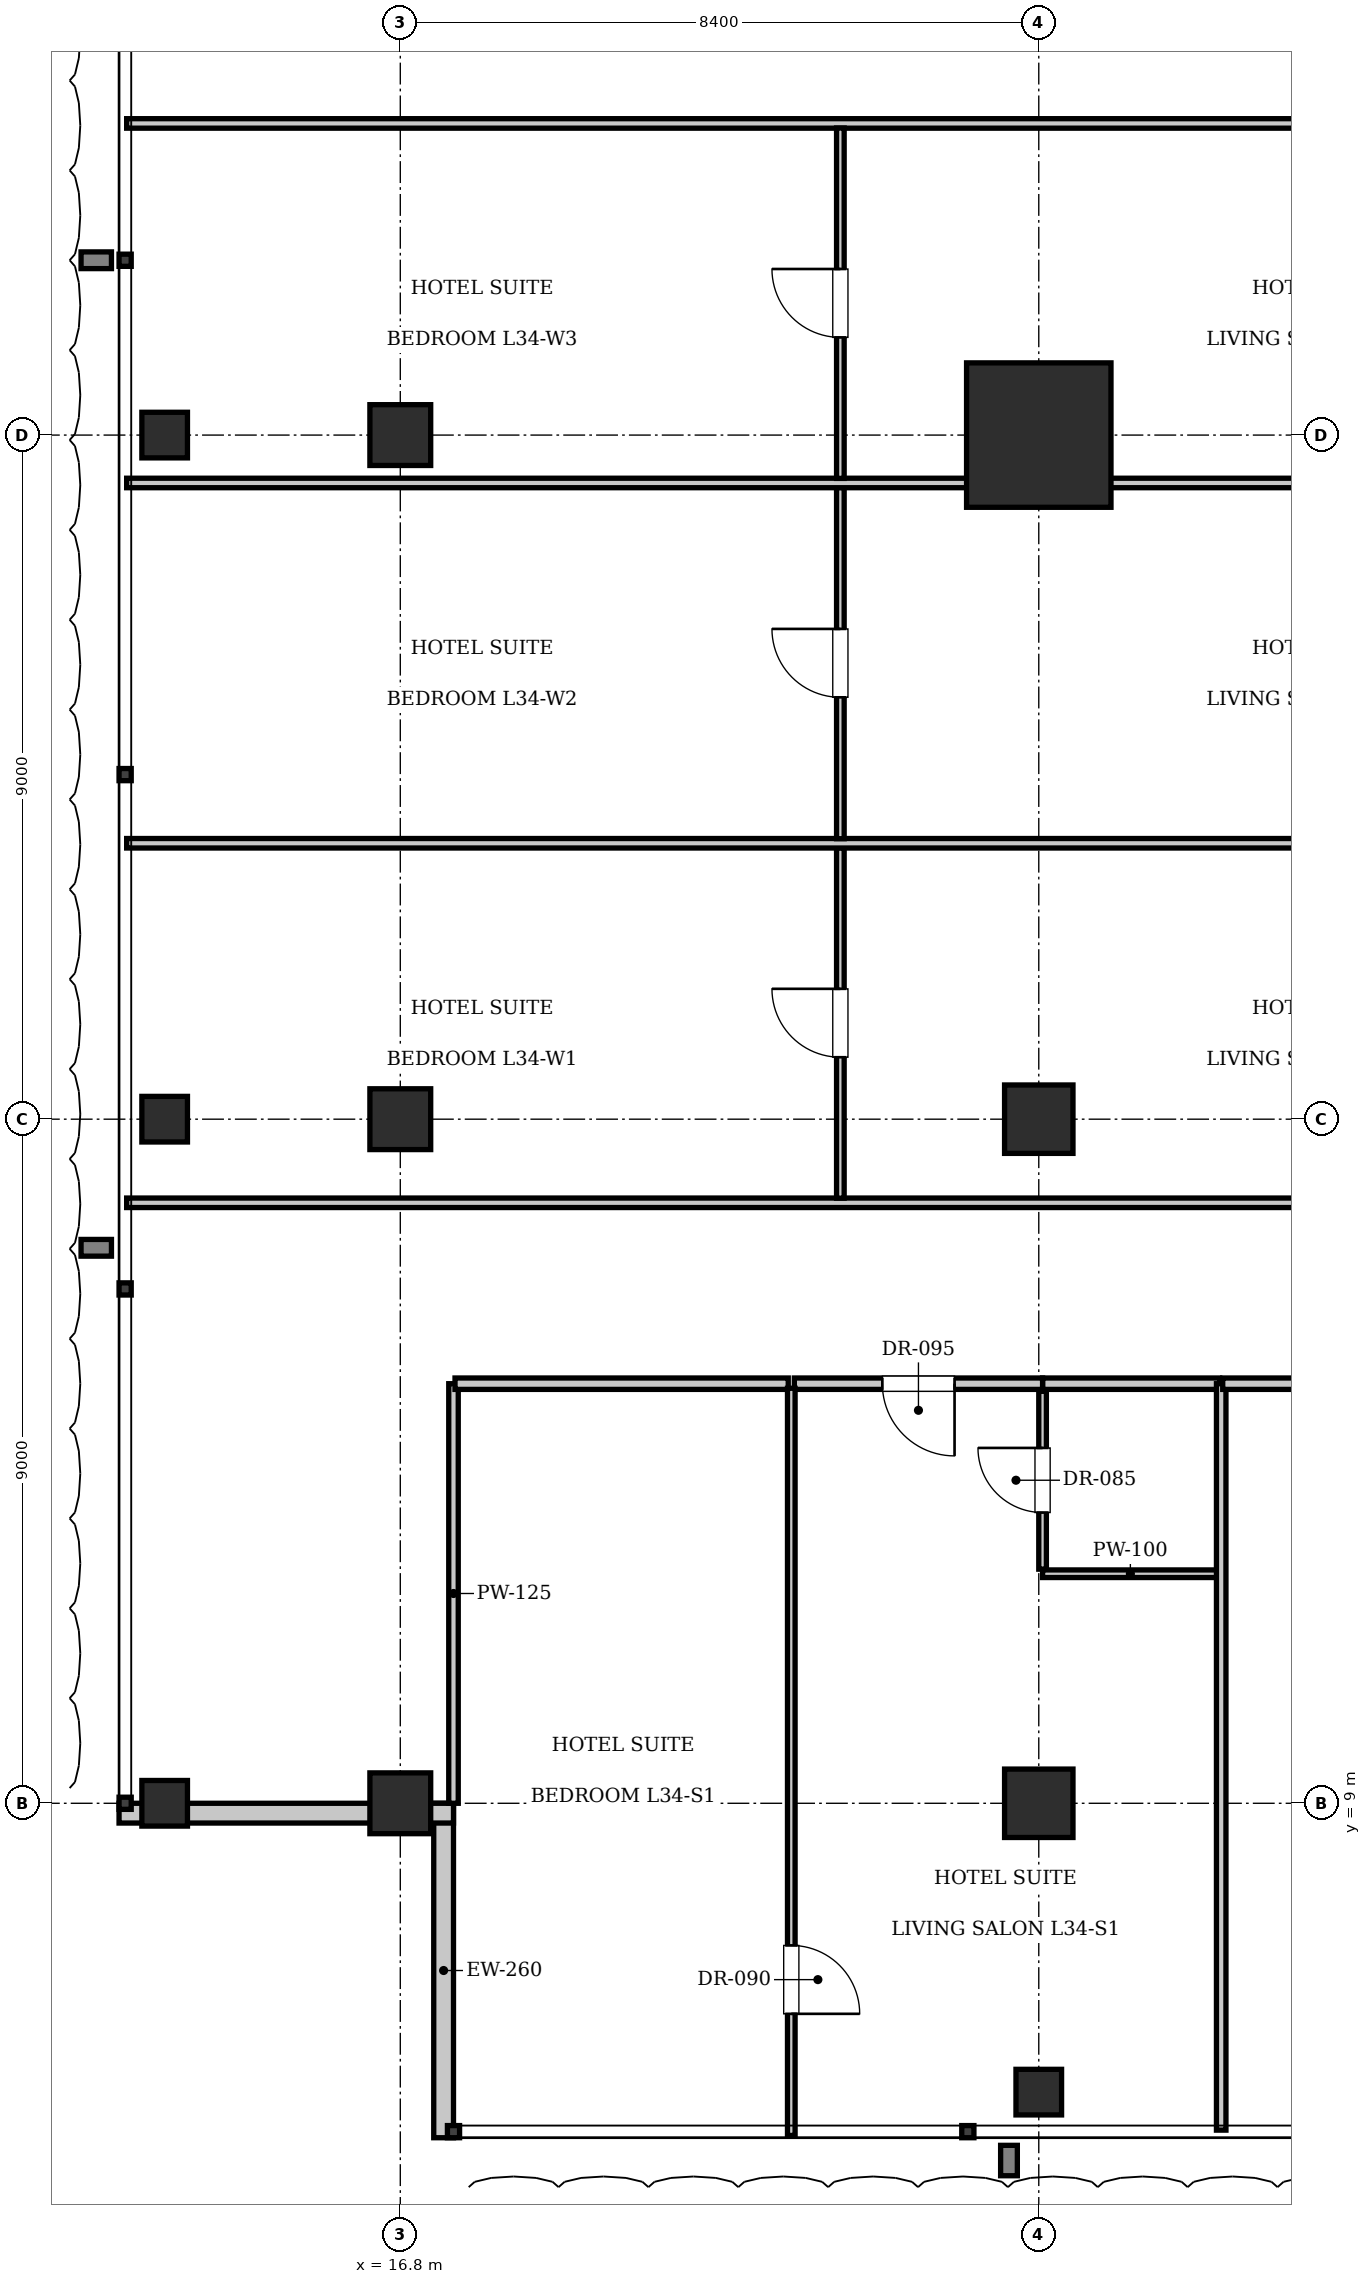
"""IFC4 building model, lengths in metres.
Left out: names, types, materials, properties, quantities, classifications, styles, units other than length and angle.
Written with IfcOpenShell. Run it as: python <this file> out.ifc"""

import sys

from ifc_helpers import new_model, si_unit, direction, frame, frame_2d, origin, origin_2d, place, context, subcontext, project, spatial, rectangle, i_section, extrude, element, fill, save


model = new_model("IFC4")
c1 = context("Model", 3, precision=1e-05, world=origin(), true_north=direction((0.0, 1.0)))
c2 = subcontext(c1, "Body", "Model", "MODEL_VIEW")
j1 = project(units=[si_unit("LENGTHUNIT", "METRE"), si_unit("PLANEANGLEUNIT", "RADIAN")], contexts=[c1])
p1 = place(None, origin())
s1 = spatial("IfcSite", under=j1, at=p1, CompositionType="ELEMENT")
p2 = place(p1, origin())
s2 = spatial("IfcBuilding", under=s1, at=p2, CompositionType="ELEMENT")
p3 = place(p2, frame((0.0, 0.0, 142.8)))
s3 = spatial("IfcBuildingStorey", under=s2, at=p3, CompositionType="ELEMENT", Elevation=142.8)
p4 = place(p3, frame((25.2, 27.0, 0.0), z_axis=(0.0, 0.0, 1.0), x_axis=(1.0, 0.0, 0.0)))
e1 = element("IfcColumn", 1, at=p4, inside=s3, PredefinedType="COLUMN", context=c2, shape_type="SweptSolid", body=[
    extrude(rectangle(XDim=1.9, YDim=1.9, at=origin_2d()), origin(), (0.0, 0.0, 1.0), 3.85),
])
for number, where, z_axis, x_axis in (
    (2, (25.2, 18.0, 0.0), (0.0, 0.0, 1.0), (1.0, 0.0, 0.0)),
    (3, (25.2, 9.0, 0.0), (0.0, 0.0, 1.0), (1.0, 0.0, 0.0)),
):
    element("IfcColumn", number, at=place(p3, frame(where, z_axis=z_axis, x_axis=x_axis)), inside=s3, PredefinedType="COLUMN", context=c2, shape_type="SweptSolid", body=[
        extrude(rectangle(XDim=0.9, YDim=0.9, at=origin_2d()), origin(), (0.0, 0.0, 1.0), 3.85),
    ])
for number, where, z_axis, x_axis in (
    (4, (16.8, 9.0, 0.0), (0.0, 0.0, 1.0), (1.0, 0.0, 0.0)),
    (5, (16.8, 18.0, 0.0), (0.0, 0.0, 1.0), (1.0, 0.0, 0.0)),
    (6, (16.8, 27.0, 0.0), (0.0, 0.0, 1.0), (1.0, 0.0, 0.0)),
):
    element("IfcColumn", number, at=place(p3, frame(where, z_axis=z_axis, x_axis=x_axis)), inside=s3, PredefinedType="COLUMN", context=c2, shape_type="SweptSolid", body=[
        extrude(rectangle(XDim=0.8, YDim=0.8, at=origin_2d()), origin(), (0.0, 0.0, 1.0), 3.85),
    ])
for number, where, z_axis, x_axis in (
    (7, (13.7, 9.0, 0.0), (0.0, 0.0, 1.0), (1.0, 0.0, 0.0)),
    (8, (13.7, 18.0, 0.0), (0.0, 0.0, 1.0), (1.0, 0.0, 0.0)),
    (9, (13.7, 27.0, 0.0), (0.0, 0.0, 1.0), (1.0, 0.0, 0.0)),
    (10, (25.2, 5.2, 0.0), (0.0, 0.0, 1.0), (1.0, 0.0, 0.0)),
):
    element("IfcColumn", number, at=place(p3, frame(where, z_axis=z_axis, x_axis=x_axis)), inside=s3, PredefinedType="COLUMN", context=c2, shape_type="SweptSolid", body=[
        extrude(i_section(OverallWidth=0.6, OverallDepth=0.6, WebThickness=0.025, FlangeThickness=0.038, at=origin_2d()), origin(), (0.0, 0.0, 1.0), 3.85),
    ])
p5 = place(p3, frame((17.37, 4.6, 0.0), z_axis=(0.0, 0.0, 1.0), x_axis=(0.0, 1.0, 0.0)))
e11 = element("IfcWall", 11, at=p5, inside=s3, PredefinedType="SOLIDWALL", context=c2, shape_type="SweptSolid", body=[
    extrude(rectangle(XDim=4.4, YDim=0.26, at=frame_2d((2.2, 0.0))), origin(), (0.0, 0.0, 1.0), 3.61),
])
p6 = place(p3, frame((17.5, 8.87, 0.0), z_axis=(0.0, 0.0, 1.0), x_axis=(-1.0, 0.0, 0.0)))
e12 = element("IfcWall", 12, at=p6, inside=s3, PredefinedType="SOLIDWALL", context=c2, shape_type="SweptSolid", body=[
    extrude(rectangle(XDim=4.4, YDim=0.26, at=frame_2d((2.2, 0.0))), origin(), (0.0, 0.0, 1.0), 2.998),
])
p7 = place(p3, frame((17.5, 9.0, 0.0), z_axis=(0.0, 0.0, 1.0), x_axis=(0.0, 1.0, 0.0)))
e13 = element("IfcWall", 13, at=p7, inside=s3, PredefinedType="PARTITIONING", context=c2, shape_type="SweptSolid", body=[
    extrude(rectangle(XDim=5.52, YDim=0.125, at=frame_2d((2.76, 0.0))), origin(), (0.0, 0.0, 1.0), 3.61),
])
p8 = place(p3, frame((25.25, 14.52, 0.0), z_axis=(0.0, 0.0, 1.0), x_axis=(1.0, 0.0, 0.0)))
e14 = element("IfcWall", 14, at=p8, inside=s3, PredefinedType="PARTITIONING", context=c2, shape_type="SweptSolid", body=[
    extrude(rectangle(XDim=2.33, YDim=0.15, at=frame_2d((1.165, 0.0))), origin(), (0.0, 0.0, 1.0), 3.61),
])
p9 = place(p3, frame((25.25, 12.02, 0.0), z_axis=(0.0, 0.0, 1.0), x_axis=(1.0, 0.0, 0.0)))
e15 = element("IfcWall", 15, at=p9, inside=s3, PredefinedType="PARTITIONING", context=c2, shape_type="SweptSolid", body=[
    extrude(rectangle(XDim=2.31, YDim=0.1, at=frame_2d((1.155, 0.0))), origin(), (0.0, 0.0, 1.0), 3.61),
])
p10 = place(p3, frame((25.25, 12.08, 0.0), z_axis=(0.0, 0.0, 1.0), x_axis=(0.0, 1.0, 0.0)))
e16 = element("IfcWall", 16, at=p10, inside=s3, PredefinedType="PARTITIONING", context=c2, shape_type="SweptSolid", body=[
    extrude(rectangle(XDim=2.34, YDim=0.1, at=frame_2d((1.17, 0.0))), origin(), (0.0, 0.0, 1.0), 2.998),
])
p11 = place(p10, frame((0.745, 0.0, 0.0)))
e17 = element("IfcOpeningElement", 17, at=p11, cuts=e16, PredefinedType="OPENING", context=c2, shape_type="SweptSolid", body=[
    extrude(rectangle(XDim=0.85, YDim=2.1, at=frame_2d((0.425, 1.05))), frame((0.0, 0.06, 0.0), z_axis=(0.0, -1.0, 0.0), x_axis=(1.0, 0.0, 0.0)), (0.0, 0.0, 1.0), 0.12),
])
p12 = place(p3, frame((17.52, 14.52, 0.0), z_axis=(0.0, 0.0, 1.0), x_axis=(1.0, 0.0, 0.0)))
e18 = element("IfcWall", 18, at=p12, inside=s3, PredefinedType="PARTITIONING", context=c2, shape_type="SweptSolid", body=[
    extrude(rectangle(XDim=4.384, YDim=0.15, at=frame_2d((2.192, 0.0))), origin(), (0.0, 0.0, 1.0), 3.61),
])
p13 = place(p3, frame((21.984, 14.52, 0.0), z_axis=(0.0, 0.0, 1.0), x_axis=(1.0, 0.0, 0.0)))
e19 = element("IfcWall", 19, at=p13, inside=s3, PredefinedType="PARTITIONING", context=c2, shape_type="SweptSolid", body=[
    extrude(rectangle(XDim=3.266, YDim=0.15, at=frame_2d((1.633, 0.0))), origin(), (0.0, 0.0, 1.0), 3.61),
])
p14 = place(p13, frame((1.158, 0.0, 0.0)))
e20 = element("IfcOpeningElement", 20, at=p14, cuts=e19, PredefinedType="OPENING", context=c2, shape_type="SweptSolid", body=[
    extrude(rectangle(XDim=0.95, YDim=2.15, at=frame_2d((0.475, 1.075))), frame((0.0, 0.085, 0.0), z_axis=(0.0, -1.0, 0.0), x_axis=(1.0, 0.0, 0.0)), (0.0, 0.0, 1.0), 0.17),
])
p15 = place(p3, frame((21.944, 4.63, 0.0), z_axis=(0.0, 0.0, 1.0), x_axis=(0.0, 1.0, 0.0)))
e21 = element("IfcWall", 21, at=p15, inside=s3, PredefinedType="PARTITIONING", context=c2, shape_type="SweptSolid", body=[
    extrude(rectangle(XDim=9.83, YDim=0.1, at=frame_2d((4.915, 0.0))), origin(), (0.0, 0.0, 1.0), 3.61),
])
p16 = place(p15, frame((1.6, 0.0, 0.0)))
e22 = element("IfcOpeningElement", 22, at=p16, cuts=e21, PredefinedType="OPENING", context=c2, shape_type="SweptSolid", body=[
    extrude(rectangle(XDim=0.9, YDim=2.1, at=frame_2d((0.45, 1.05))), frame((0.0, 0.06, 0.0), z_axis=(0.0, -1.0, 0.0), x_axis=(1.0, 0.0, 0.0)), (0.0, 0.0, 1.0), 0.12),
])
p17 = place(p3, frame((27.6, 4.7, 0.0), z_axis=(0.0, 0.0, 1.0), x_axis=(0.0, 1.0, 0.0)))
e23 = element("IfcWall", 23, at=p17, inside=s3, PredefinedType="PARTITIONING", context=c2, shape_type="SweptSolid", body=[
    extrude(rectangle(XDim=9.82, YDim=0.125, at=frame_2d((4.91, 0.0))), origin(), (0.0, 0.0, 1.0), 3.61),
])
p18 = place(p3, frame((27.62, 14.52, 0.0), z_axis=(0.0, 0.0, 1.0), x_axis=(1.0, 0.0, 0.0)))
e24 = element("IfcWall", 24, at=p18, inside=s3, PredefinedType="PARTITIONING", context=c2, shape_type="SweptSolid", body=[
    extrude(rectangle(XDim=4.428, YDim=0.15, at=frame_2d((2.214, 0.0))), origin(), (0.0, 0.0, 1.0), 3.61),
])
for number, where, z_axis, x_axis in (
    (25, (13.2, 16.9, 0.0), (0.0, 0.0, 1.0), (1.0, 0.0, 0.0)),
    (26, (13.2, 31.1, 0.0), (0.0, 0.0, 1.0), (1.0, 0.0, 0.0)),
):
    element("IfcWall", number, at=place(p3, frame(where, z_axis=z_axis, x_axis=x_axis)), inside=s3, PredefinedType="PARTITIONING", context=c2, shape_type="SweptSolid", body=[
        extrude(rectangle(XDim=22.12, YDim=0.125, at=frame_2d((11.06, 0.0))), origin(), (0.0, 0.0, 1.0), 3.61),
    ])
p19 = place(p3, frame((22.59, 16.96, 0.0), z_axis=(0.0, 0.0, 1.0), x_axis=(0.0, 1.0, 0.0)))
e27 = element("IfcWall", 27, at=p19, inside=s3, PredefinedType="PARTITIONING", context=c2, shape_type="SweptSolid", body=[
    extrude(rectangle(XDim=4.61, YDim=0.1, at=frame_2d((2.305, 0.0))), origin(), (0.0, 0.0, 1.0), 3.61),
])
p20 = place(p19, frame((1.855, 0.0, 0.0)))
e28 = element("IfcOpeningElement", 28, at=p20, cuts=e27, PredefinedType="OPENING", context=c2, shape_type="SweptSolid", body=[
    extrude(rectangle(XDim=0.9, YDim=2.1, at=frame_2d((0.45, 1.05))), frame((0.0, 0.06, 0.0), z_axis=(0.0, -1.0, 0.0), x_axis=(1.0, 0.0, 0.0)), (0.0, 0.0, 1.0), 0.12),
])
p21 = place(p3, frame((13.2, 21.63, 0.0), z_axis=(0.0, 0.0, 1.0), x_axis=(1.0, 0.0, 0.0)))
e29 = element("IfcWall", 29, at=p21, inside=s3, PredefinedType="PARTITIONING", context=c2, shape_type="SweptSolid", body=[
    extrude(rectangle(XDim=22.12, YDim=0.125, at=frame_2d((11.06, 0.0))), origin(), (0.0, 0.0, 1.0), 3.61),
])
p22 = place(p3, frame((22.59, 21.69, 0.0), z_axis=(0.0, 0.0, 1.0), x_axis=(0.0, 1.0, 0.0)))
e30 = element("IfcWall", 30, at=p22, inside=s3, PredefinedType="PARTITIONING", context=c2, shape_type="SweptSolid", body=[
    extrude(rectangle(XDim=4.62, YDim=0.1, at=frame_2d((2.31, 0.0))), origin(), (0.0, 0.0, 1.0), 3.61),
])
p23 = place(p22, frame((1.86, 0.0, 0.0)))
e31 = element("IfcOpeningElement", 31, at=p23, cuts=e30, PredefinedType="OPENING", context=c2, shape_type="SweptSolid", body=[
    extrude(rectangle(XDim=0.9, YDim=2.1, at=frame_2d((0.45, 1.05))), frame((0.0, 0.06, 0.0), z_axis=(0.0, -1.0, 0.0), x_axis=(1.0, 0.0, 0.0)), (0.0, 0.0, 1.0), 0.12),
])
p24 = place(p3, frame((13.2, 26.37, 0.0), z_axis=(0.0, 0.0, 1.0), x_axis=(1.0, 0.0, 0.0)))
e32 = element("IfcWall", 32, at=p24, inside=s3, PredefinedType="PARTITIONING", context=c2, shape_type="SweptSolid", body=[
    extrude(rectangle(XDim=22.12, YDim=0.125, at=frame_2d((11.06, 0.0))), origin(), (0.0, 0.0, 1.0), 3.61),
])
p25 = place(p3, frame((22.59, 26.43, 0.0), z_axis=(0.0, 0.0, 1.0), x_axis=(0.0, 1.0, 0.0)))
e33 = element("IfcWall", 33, at=p25, inside=s3, PredefinedType="PARTITIONING", context=c2, shape_type="SweptSolid", body=[
    extrude(rectangle(XDim=4.61, YDim=0.1, at=frame_2d((2.305, 0.0))), origin(), (0.0, 0.0, 1.0), 3.61),
])
p26 = place(p25, frame((1.855, 0.0, 0.0)))
e34 = element("IfcOpeningElement", 34, at=p26, cuts=e33, PredefinedType="OPENING", context=c2, shape_type="SweptSolid", body=[
    extrude(rectangle(XDim=0.9, YDim=2.1, at=frame_2d((0.45, 1.05))), frame((0.0, 0.06, 0.0), z_axis=(0.0, -1.0, 0.0), x_axis=(1.0, 0.0, 0.0)), (0.0, 0.0, 1.0), 0.12),
])
p27 = place(p11, origin())
e35 = element("IfcDoor", 35, at=p27, inside=s3, OperationType="SINGLE_SWING_RIGHT", PredefinedType="DOOR", context=c2, shape_type="SweptSolid", body=[
    extrude(rectangle(XDim=0.85, YDim=2.1, at=frame_2d((0.425, 1.05))), frame((0.0, 0.025, 0.0), z_axis=(0.0, -1.0, 0.0), x_axis=(1.0, 0.0, 0.0)), (0.0, 0.0, 1.0), 0.05),
])
fill(e17, e35)
p28 = place(p14, frame((0.95, 0.0, 0.0), z_axis=(0.0, 0.0, 1.0), x_axis=(-1.0, 0.0, 0.0)))
e36 = element("IfcDoor", 36, at=p28, inside=s3, OperationType="SINGLE_SWING_LEFT", PredefinedType="DOOR", context=c2, shape_type="SweptSolid", body=[
    extrude(rectangle(XDim=0.95, YDim=2.15, at=frame_2d((0.475, 1.075))), frame((0.0, 0.025, 0.0), z_axis=(0.0, -1.0, 0.0), x_axis=(1.0, 0.0, 0.0)), (0.0, 0.0, 1.0), 0.05),
])
fill(e20, e36)
p29 = place(p16, frame((0.9, 0.0, 0.0), z_axis=(0.0, 0.0, 1.0), x_axis=(-1.0, 0.0, 0.0)))
e37 = element("IfcDoor", 37, at=p29, inside=s3, OperationType="SINGLE_SWING_RIGHT", PredefinedType="DOOR", context=c2, shape_type="SweptSolid", body=[
    extrude(rectangle(XDim=0.9, YDim=2.1, at=frame_2d((0.45, 1.05))), frame((0.0, 0.025, 0.0), z_axis=(0.0, -1.0, 0.0), x_axis=(1.0, 0.0, 0.0)), (0.0, 0.0, 1.0), 0.05),
])
fill(e22, e37)
p30 = place(p20, origin())
e38 = element("IfcDoor", 38, at=p30, inside=s3, OperationType="SINGLE_SWING_RIGHT", PredefinedType="DOOR", context=c2, shape_type="SweptSolid", body=[
    extrude(rectangle(XDim=0.9, YDim=2.1, at=frame_2d((0.45, 1.05))), frame((0.0, 0.025, 0.0), z_axis=(0.0, -1.0, 0.0), x_axis=(1.0, 0.0, 0.0)), (0.0, 0.0, 1.0), 0.05),
])
fill(e28, e38)
p31 = place(p23, origin())
e39 = element("IfcDoor", 39, at=p31, inside=s3, OperationType="SINGLE_SWING_RIGHT", PredefinedType="DOOR", context=c2, shape_type="SweptSolid", body=[
    extrude(rectangle(XDim=0.9, YDim=2.1, at=frame_2d((0.45, 1.05))), frame((0.0, 0.025, 0.0), z_axis=(0.0, -1.0, 0.0), x_axis=(1.0, 0.0, 0.0)), (0.0, 0.0, 1.0), 0.05),
])
fill(e31, e39)
p32 = place(p26, origin())
e40 = element("IfcDoor", 40, at=p32, inside=s3, OperationType="SINGLE_SWING_RIGHT", PredefinedType="DOOR", context=c2, shape_type="SweptSolid", body=[
    extrude(rectangle(XDim=0.9, YDim=2.1, at=frame_2d((0.45, 1.05))), frame((0.0, 0.025, 0.0), z_axis=(0.0, -1.0, 0.0), x_axis=(1.0, 0.0, 0.0)), (0.0, 0.0, 1.0), 0.05),
])
fill(e34, e40)
save(model, sys.argv[1])
